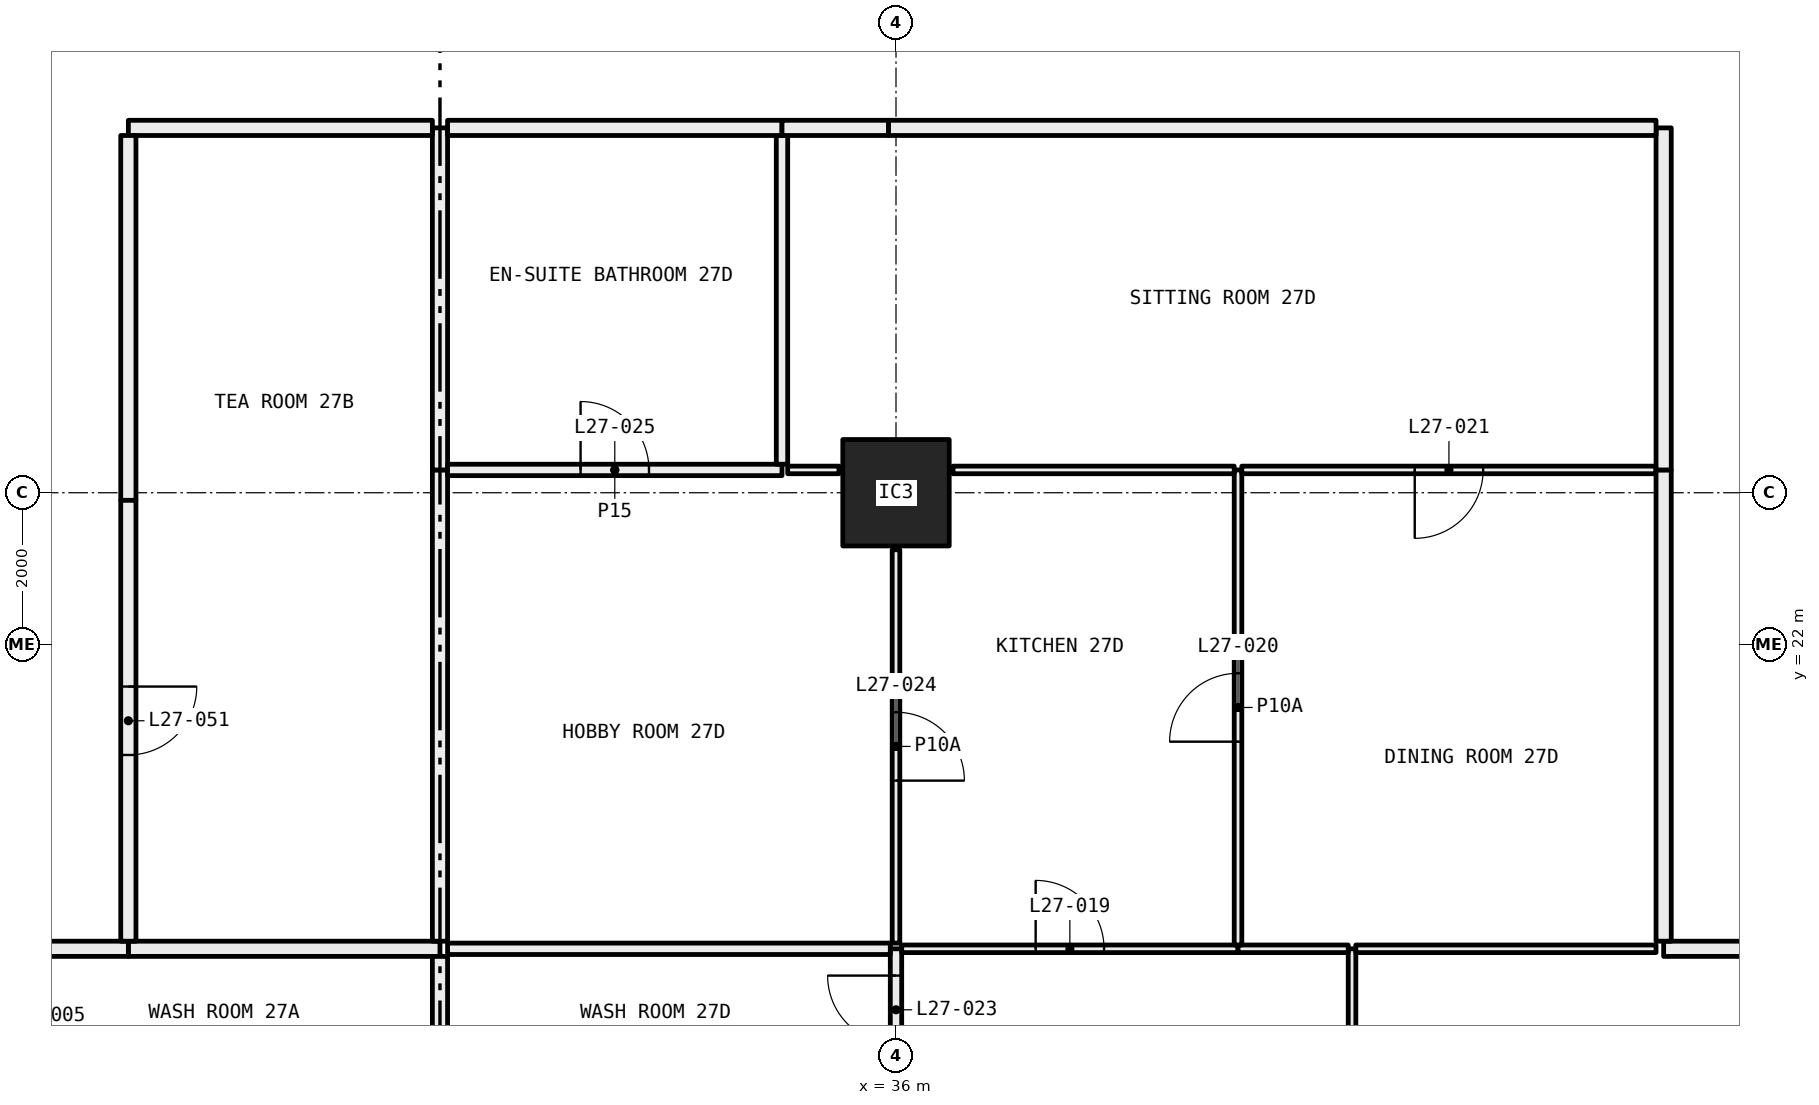
"""IFC4 building model, lengths in metres.
Left out: names, types, materials, properties, quantities, classifications, styles, units other than length and angle.
Written with IfcOpenShell. Run it as: python <this file> out.ifc"""

import sys

from ifc_helpers import new_model, si_unit, direction, frame, frame_2d, origin, origin_2d, place, context, subcontext, project, spatial, rectangle, hollow_rectangle, extrude, element, fill, save


model = new_model("IFC4")
c1 = context("Model", 3, precision=1e-05, world=origin(), true_north=direction((0.0, 1.0)))
c2 = subcontext(c1, "Body", "Model", "MODEL_VIEW")
j1 = project(units=[si_unit("LENGTHUNIT", "METRE"), si_unit("PLANEANGLEUNIT", "RADIAN")], contexts=[c1])
p1 = place(None, origin())
s1 = spatial("IfcSite", under=j1, at=p1, CompositionType="ELEMENT")
p2 = place(p1, origin())
s2 = spatial("IfcBuilding", under=s1, at=p2, CompositionType="ELEMENT")
p3 = place(p2, frame((0.0, 0.0, 106.95)))
s3 = spatial("IfcBuildingStorey", under=s2, at=p3, CompositionType="ELEMENT", Elevation=106.95)
p4 = place(p3, frame((36.0, 24.0, 0.0), z_axis=(0.0, 0.0, 1.0), x_axis=(1.0, 0.0, 0.0)))
e1 = element("IfcColumn", 1, at=p4, inside=s3, PredefinedType="COLUMN", context=c2, shape_type="SweptSolid", body=[
    extrude(hollow_rectangle(XDim=1.4, YDim=1.4, WallThickness=0.06, at=origin_2d()), origin(), (0.0, 0.0, 1.0), 3.05),
])
p5 = place(p3, frame((30.0, 18.0, 0.0), z_axis=(0.0, 0.0, 1.0), x_axis=(-1.0, 0.0, 0.0)))
e2 = element("IfcWall", 2, at=p5, inside=s3, PredefinedType="PARTITIONING", context=c2, shape_type="SweptSolid", body=[
    extrude(rectangle(XDim=4.1, YDim=0.2, at=frame_2d((2.05, 0.0))), origin(), (0.0, 0.0, 1.0), 3.05),
])
p6 = place(p3, frame((30.0, 16.32, 0.0), z_axis=(0.0, 0.0, 1.0), x_axis=(0.0, 1.0, 0.0)))
e3 = element("IfcWall", 3, at=p6, inside=s3, PredefinedType="PARTITIONING", context=c2, shape_type="SweptSolid", body=[
    extrude(rectangle(XDim=1.58, YDim=0.2, at=frame_2d((0.79, 0.0))), origin(), (0.0, 0.0, 1.0), 3.05),
])
p7 = place(p3, frame((25.9, 18.0, 0.0), z_axis=(0.0, 0.0, 1.0), x_axis=(-1.0, 0.0, 0.0)))
e4 = element("IfcWall", 4, at=p7, inside=s3, PredefinedType="PARTITIONING", context=c2, shape_type="SweptSolid", body=[
    extrude(rectangle(XDim=1.9, YDim=0.2, at=frame_2d((0.95, 0.0))), origin(), (0.0, 0.0, 1.0), 3.05),
])
p8 = place(p3, frame((30.0, 18.1, 0.0), z_axis=(0.0, 0.0, 1.0), x_axis=(0.0, 1.0, 0.0)))
e5 = element("IfcWall", 5, at=p8, inside=s3, PredefinedType="PARTITIONING", context=c2, shape_type="SweptSolid", body=[
    extrude(rectangle(XDim=6.2, YDim=0.2, at=frame_2d((3.1, 0.0))), origin(), (0.0, 0.0, 1.0), 2.45),
])
p9 = place(p3, frame((30.0, 24.3, 0.0), z_axis=(0.0, 0.0, 1.0), x_axis=(0.0, 1.0, 0.0)))
e6 = element("IfcWall", 6, at=p9, inside=s3, PredefinedType="PARTITIONING", context=c2, shape_type="SweptSolid", body=[
    extrude(rectangle(XDim=4.5, YDim=0.2, at=frame_2d((2.25, 0.0))), origin(), (0.0, 0.0, 1.0), 3.05),
])
p10 = place(p3, frame((29.9, 28.8, 0.0), z_axis=(0.0, 0.0, 1.0), x_axis=(-1.0, 0.0, 0.0)))
e7 = element("IfcWall", 7, at=p10, inside=s3, PredefinedType="PARTITIONING", context=c2, shape_type="SweptSolid", body=[
    extrude(rectangle(XDim=4.0, YDim=0.2, at=frame_2d((2.0, 0.0))), origin(), (0.0, 0.0, 1.0), 3.05),
])
p11 = place(p3, frame((25.9, 28.7, 0.0), z_axis=(0.0, 0.0, 1.0), x_axis=(0.0, -1.0, 0.0)))
e8 = element("IfcWall", 8, at=p11, inside=s3, PredefinedType="PARTITIONING", context=c2, shape_type="SweptSolid", body=[
    extrude(rectangle(XDim=4.8, YDim=0.2, at=frame_2d((2.4, 0.0))), origin(), (0.0, 0.0, 1.0), 2.45),
])
p12 = place(p3, frame((25.9, 23.9, 0.0), z_axis=(0.0, 0.0, 1.0), x_axis=(0.0, -1.0, 0.0)))
e9 = element("IfcWall", 9, at=p12, inside=s3, PredefinedType="PARTITIONING", context=c2, shape_type="SweptSolid", body=[
    extrude(rectangle(XDim=5.8, YDim=0.2, at=frame_2d((2.9, 0.0))), origin(), (0.0, 0.0, 1.0), 3.05),
])
p13 = place(p12, frame((2.45, 0.0, 0.0)))
e10 = element("IfcOpeningElement", 10, at=p13, cuts=e9, PredefinedType="OPENING", context=c2, shape_type="SweptSolid", body=[
    extrude(rectangle(XDim=0.9, YDim=2.1, at=frame_2d((0.45, 1.05))), frame((0.0, 0.11, 0.0), z_axis=(0.0, -1.0, 0.0), x_axis=(1.0, 0.0, 0.0)), (0.0, 0.0, 1.0), 0.22),
])
p14 = place(p3, frame((36.0, 16.395, 0.0), z_axis=(0.0, 0.0, 1.0), x_axis=(0.0, 1.0, 0.0)))
e11 = element("IfcWall", 11, at=p14, inside=s3, PredefinedType="PARTITIONING", context=c2, shape_type="SweptSolid", body=[
    extrude(rectangle(XDim=1.605, YDim=0.15, at=frame_2d((0.802, 0.0))), origin(), (0.0, 0.0, 1.0), 2.45),
])
p15 = place(p14, frame((0.353, 0.0, 0.0)))
e12 = element("IfcOpeningElement", 12, at=p15, cuts=e11, PredefinedType="OPENING", context=c2, shape_type="SweptSolid", body=[
    extrude(rectangle(XDim=0.9, YDim=2.1, at=frame_2d((0.45, 1.05))), frame((0.0, 0.085, 0.0), z_axis=(0.0, -1.0, 0.0), x_axis=(1.0, 0.0, 0.0)), (0.0, 0.0, 1.0), 0.17),
])
p16 = place(p3, frame((35.925, 18.0, 0.0), z_axis=(0.0, 0.0, 1.0), x_axis=(-1.0, 0.0, 0.0)))
e13 = element("IfcWall", 13, at=p16, inside=s3, PredefinedType="PARTITIONING", context=c2, shape_type="SweptSolid", body=[
    extrude(rectangle(XDim=5.825, YDim=0.15, at=frame_2d((2.913, 0.0))), origin(), (0.0, 0.0, 1.0), 2.45),
])
p17 = place(p3, frame((42.0, 12.72, 0.0), z_axis=(0.0, 0.0, 1.0), x_axis=(0.0, 1.0, 0.0)))
e14 = element("IfcWall", 14, at=p17, inside=s3, PredefinedType="PARTITIONING", context=c2, shape_type="SweptSolid", body=[
    extrude(rectangle(XDim=5.28, YDim=0.1, at=frame_2d((2.64, 0.0))), origin(), (0.0, 0.0, 1.0), 3.05),
])
p18 = place(p17, frame((2.19, 0.0, 0.0)))
e15 = element("IfcOpeningElement", 15, at=p18, cuts=e14, PredefinedType="OPENING", context=c2, shape_type="SweptSolid", body=[
    extrude(rectangle(XDim=0.9, YDim=2.1, at=frame_2d((0.45, 1.05))), frame((0.0, 0.06, 0.0), z_axis=(0.0, -1.0, 0.0), x_axis=(1.0, 0.0, 0.0)), (0.0, 0.0, 1.0), 0.12),
])
p19 = place(p3, frame((40.5, 18.0, 0.0), z_axis=(0.0, 0.0, 1.0), x_axis=(-1.0, 0.0, 0.0)))
e16 = element("IfcWall", 16, at=p19, inside=s3, PredefinedType="PARTITIONING", context=c2, shape_type="SweptSolid", body=[
    extrude(rectangle(XDim=4.425, YDim=0.1, at=frame_2d((2.212, 0.0))), origin(), (0.0, 0.0, 1.0), 2.45),
])
p20 = place(p19, frame((1.762, 0.0, 0.0)))
e17 = element("IfcOpeningElement", 17, at=p20, cuts=e16, PredefinedType="OPENING", context=c2, shape_type="SweptSolid", body=[
    extrude(rectangle(XDim=0.9, YDim=2.1, at=frame_2d((0.45, 1.05))), frame((0.0, 0.06, 0.0), z_axis=(0.0, -1.0, 0.0), x_axis=(1.0, 0.0, 0.0)), (0.0, 0.0, 1.0), 0.12),
])
p21 = place(p3, frame((41.95, 18.0, 0.0), z_axis=(0.0, 0.0, 1.0), x_axis=(-1.0, 0.0, 0.0)))
e18 = element("IfcWall", 18, at=p21, inside=s3, PredefinedType="PARTITIONING", context=c2, shape_type="SweptSolid", body=[
    extrude(rectangle(XDim=1.45, YDim=0.1, at=frame_2d((0.725, 0.0))), origin(), (0.0, 0.0, 1.0), 3.05),
])
p22 = place(p3, frame((46.0, 18.0, 0.0), z_axis=(0.0, 0.0, 1.0), x_axis=(-1.0, 0.0, 0.0)))
e19 = element("IfcWall", 19, at=p22, inside=s3, PredefinedType="PARTITIONING", context=c2, shape_type="SweptSolid", body=[
    extrude(rectangle(XDim=3.95, YDim=0.1, at=frame_2d((1.975, 0.0))), origin(), (0.0, 0.0, 1.0), 3.05),
])
p23 = place(p3, frame((48.0, 18.0, 0.0), z_axis=(0.0, 0.0, 1.0), x_axis=(-1.0, 0.0, 0.0)))
e20 = element("IfcWall", 20, at=p23, inside=s3, PredefinedType="PARTITIONING", context=c2, shape_type="SweptSolid", body=[
    extrude(rectangle(XDim=1.9, YDim=0.2, at=frame_2d((0.95, 0.0))), origin(), (0.0, 0.0, 1.0), 3.05),
])
p24 = place(p3, frame((36.0, 18.075, 0.0), z_axis=(0.0, 0.0, 1.0), x_axis=(0.0, 1.0, 0.0)))
e21 = element("IfcWall", 21, at=p24, inside=s3, PredefinedType="PARTITIONING", context=c2, shape_type="SweptSolid", body=[
    extrude(rectangle(XDim=5.175, YDim=0.1, at=frame_2d((2.587, 0.0))), origin(), (0.0, 0.0, 1.0), 2.45),
])
p25 = place(p24, frame((2.137, 0.0, 0.0)))
e22 = element("IfcOpeningElement", 22, at=p25, cuts=e21, PredefinedType="OPENING", context=c2, shape_type="SweptSolid", body=[
    extrude(rectangle(XDim=0.9, YDim=2.1, at=frame_2d((0.45, 1.05))), frame((0.0, 0.06, 0.0), z_axis=(0.0, -1.0, 0.0), x_axis=(1.0, 0.0, 0.0)), (0.0, 0.0, 1.0), 0.12),
])
p26 = place(p3, frame((34.5, 24.3, 0.0), z_axis=(0.0, 0.0, 1.0), x_axis=(-1.0, 0.0, 0.0)))
e23 = element("IfcWall", 23, at=p26, inside=s3, PredefinedType="PARTITIONING", context=c2, shape_type="SweptSolid", body=[
    extrude(rectangle(XDim=4.4, YDim=0.15, at=frame_2d((2.2, 0.0))), origin(), (0.0, 0.0, 1.0), 3.05),
])
p27 = place(p26, frame((1.75, 0.0, 0.0)))
e24 = element("IfcOpeningElement", 24, at=p27, cuts=e23, PredefinedType="OPENING", context=c2, shape_type="SweptSolid", body=[
    extrude(rectangle(XDim=0.9, YDim=2.1, at=frame_2d((0.45, 1.05))), frame((0.0, 0.085, 0.0), z_axis=(0.0, -1.0, 0.0), x_axis=(1.0, 0.0, 0.0)), (0.0, 0.0, 1.0), 0.17),
])
p28 = place(p3, frame((35.25, 24.3, 0.0), z_axis=(0.0, 0.0, 1.0), x_axis=(-1.0, 0.0, 0.0)))
e25 = element("IfcWall", 25, at=p28, inside=s3, PredefinedType="PARTITIONING", context=c2, shape_type="SweptSolid", body=[
    extrude(rectangle(XDim=0.675, YDim=0.1, at=frame_2d((0.337, 0.0))), origin(), (0.0, 0.0, 1.0), 3.05),
])
p29 = place(p3, frame((40.5, 18.05, 0.0), z_axis=(0.0, 0.0, 1.0), x_axis=(0.0, 1.0, 0.0)))
e26 = element("IfcWall", 26, at=p29, inside=s3, PredefinedType="PARTITIONING", context=c2, shape_type="SweptSolid", body=[
    extrude(rectangle(XDim=6.25, YDim=0.1, at=frame_2d((3.125, 0.0))), origin(), (0.0, 0.0, 1.0), 2.45),
])
p30 = place(p29, frame((2.675, 0.0, 0.0)))
e27 = element("IfcOpeningElement", 27, at=p30, cuts=e26, PredefinedType="OPENING", context=c2, shape_type="SweptSolid", body=[
    extrude(rectangle(XDim=0.9, YDim=2.1, at=frame_2d((0.45, 1.05))), frame((0.0, 0.06, 0.0), z_axis=(0.0, -1.0, 0.0), x_axis=(1.0, 0.0, 0.0)), (0.0, 0.0, 1.0), 0.12),
])
p31 = place(p3, frame((40.45, 24.3, 0.0), z_axis=(0.0, 0.0, 1.0), x_axis=(-1.0, 0.0, 0.0)))
e28 = element("IfcWall", 28, at=p31, inside=s3, PredefinedType="PARTITIONING", context=c2, shape_type="SweptSolid", body=[
    extrude(rectangle(XDim=3.7, YDim=0.1, at=frame_2d((1.85, 0.0))), origin(), (0.0, 0.0, 1.0), 3.05),
])
p32 = place(p3, frame((46.0, 24.3, 0.0), z_axis=(0.0, 0.0, 1.0), x_axis=(-1.0, 0.0, 0.0)))
e29 = element("IfcWall", 29, at=p32, inside=s3, PredefinedType="PARTITIONING", context=c2, shape_type="SweptSolid", body=[
    extrude(rectangle(XDim=5.45, YDim=0.1, at=frame_2d((2.725, 0.0))), origin(), (0.0, 0.0, 1.0), 3.05),
])
p33 = place(p32, frame((2.275, 0.0, 0.0)))
e30 = element("IfcOpeningElement", 30, at=p33, cuts=e29, PredefinedType="OPENING", context=c2, shape_type="SweptSolid", body=[
    extrude(rectangle(XDim=0.9, YDim=2.1, at=frame_2d((0.45, 1.05))), frame((0.0, 0.06, 0.0), z_axis=(0.0, -1.0, 0.0), x_axis=(1.0, 0.0, 0.0)), (0.0, 0.0, 1.0), 0.12),
])
p34 = place(p3, frame((46.1, 18.1, 0.0), z_axis=(0.0, 0.0, 1.0), x_axis=(0.0, 1.0, 0.0)))
e31 = element("IfcWall", 31, at=p34, inside=s3, PredefinedType="PARTITIONING", context=c2, shape_type="SweptSolid", body=[
    extrude(rectangle(XDim=6.2, YDim=0.2, at=frame_2d((3.1, 0.0))), origin(), (0.0, 0.0, 1.0), 2.45),
])
p35 = place(p3, frame((34.5, 24.375, 0.0), z_axis=(0.0, 0.0, 1.0), x_axis=(0.0, 1.0, 0.0)))
e32 = element("IfcWall", 32, at=p35, inside=s3, PredefinedType="PARTITIONING", context=c2, shape_type="SweptSolid", body=[
    extrude(rectangle(XDim=4.325, YDim=0.15, at=frame_2d((2.163, 0.0))), origin(), (0.0, 0.0, 1.0), 3.05),
])
p36 = place(p3, frame((34.5, 28.8, 0.0), z_axis=(0.0, 0.0, 1.0), x_axis=(-1.0, 0.0, 0.0)))
e33 = element("IfcWall", 33, at=p36, inside=s3, PredefinedType="PARTITIONING", context=c2, shape_type="SweptSolid", body=[
    extrude(rectangle(XDim=4.4, YDim=0.2, at=frame_2d((2.2, 0.0))), origin(), (0.0, 0.0, 1.0), 3.05),
])
p37 = place(p3, frame((46.1, 24.3, 0.0), z_axis=(0.0, 0.0, 1.0), x_axis=(0.0, 1.0, 0.0)))
e34 = element("IfcWall", 34, at=p37, inside=s3, PredefinedType="PARTITIONING", context=c2, shape_type="SweptSolid", body=[
    extrude(rectangle(XDim=4.5, YDim=0.2, at=frame_2d((2.25, 0.0))), origin(), (0.0, 0.0, 1.0), 3.05),
])
p38 = place(p3, frame((46.0, 28.8, 0.0), z_axis=(0.0, 0.0, 1.0), x_axis=(-1.0, 0.0, 0.0)))
e35 = element("IfcWall", 35, at=p38, inside=s3, PredefinedType="PARTITIONING", context=c2, shape_type="SweptSolid", body=[
    extrude(rectangle(XDim=10.1, YDim=0.2, at=frame_2d((5.05, 0.0))), origin(), (0.0, 0.0, 1.0), 2.45),
])
p39 = place(p3, frame((35.9, 28.8, 0.0), z_axis=(0.0, 0.0, 1.0), x_axis=(-1.0, 0.0, 0.0)))
e36 = element("IfcWall", 36, at=p39, inside=s3, PredefinedType="PARTITIONING", context=c2, shape_type="SweptSolid", body=[
    extrude(rectangle(XDim=1.4, YDim=0.2, at=frame_2d((0.7, 0.0))), origin(), (0.0, 0.0, 1.0), 3.05),
])
p40 = place(p20, frame((0.9, 0.0, 0.0), x_axis=(-1.0, 0.0, 0.0)))
e37 = element("IfcDoor", 37, at=p40, inside=s3, OperationType="SINGLE_SWING_RIGHT", PredefinedType="DOOR", context=c2, shape_type="SweptSolid", body=[
    extrude(rectangle(XDim=0.9, YDim=2.1, at=frame_2d((0.45, 1.05))), frame((0.0, 0.025, 0.0), z_axis=(0.0, -1.0, 0.0), x_axis=(1.0, 0.0, 0.0)), (0.0, 0.0, 1.0), 0.05),
])
fill(e17, e37)
p41 = place(p30, origin())
e38 = element("IfcDoor", 38, at=p41, inside=s3, OperationType="SINGLE_SWING_RIGHT", PredefinedType="DOOR", context=c2, shape_type="SweptSolid", body=[
    extrude(rectangle(XDim=0.9, YDim=2.1, at=frame_2d((0.45, 1.05))), frame((0.0, 0.025, 0.0), z_axis=(0.0, -1.0, 0.0), x_axis=(1.0, 0.0, 0.0)), (0.0, 0.0, 1.0), 0.05),
])
fill(e27, e38)
p42 = place(p33, origin())
e39 = element("IfcDoor", 39, at=p42, inside=s3, OperationType="SINGLE_SWING_LEFT", PredefinedType="DOOR", context=c2, shape_type="SweptSolid", body=[
    extrude(rectangle(XDim=0.9, YDim=2.1, at=frame_2d((0.45, 1.05))), frame((0.0, 0.025, 0.0), z_axis=(0.0, -1.0, 0.0), x_axis=(1.0, 0.0, 0.0)), (0.0, 0.0, 1.0), 0.05),
])
fill(e30, e39)
p43 = place(p15, origin())
e40 = element("IfcDoor", 40, at=p43, inside=s3, OperationType="SINGLE_SWING_LEFT", PredefinedType="DOOR", context=c2, shape_type="SweptSolid", body=[
    extrude(rectangle(XDim=0.9, YDim=2.1, at=frame_2d((0.45, 1.05))), frame((0.0, 0.025, 0.0), z_axis=(0.0, -1.0, 0.0), x_axis=(1.0, 0.0, 0.0)), (0.0, 0.0, 1.0), 0.05),
])
fill(e12, e40)
p44 = place(p25, frame((0.9, 0.0, 0.0), x_axis=(-1.0, 0.0, 0.0)))
e41 = element("IfcDoor", 41, at=p44, inside=s3, OperationType="SINGLE_SWING_LEFT", PredefinedType="DOOR", context=c2, shape_type="SweptSolid", body=[
    extrude(rectangle(XDim=0.9, YDim=2.1, at=frame_2d((0.45, 1.05))), frame((0.0, 0.025, 0.0), z_axis=(0.0, -1.0, 0.0), x_axis=(1.0, 0.0, 0.0)), (0.0, 0.0, 1.0), 0.05),
])
fill(e22, e41)
p45 = place(p27, frame((0.9, 0.0, 0.0), x_axis=(-1.0, 0.0, 0.0)))
e42 = element("IfcDoor", 42, at=p45, inside=s3, OperationType="SINGLE_SWING_RIGHT", PredefinedType="DOOR", context=c2, shape_type="SweptSolid", body=[
    extrude(rectangle(XDim=0.9, YDim=2.1, at=frame_2d((0.45, 1.05))), frame((0.0, 0.025, 0.0), z_axis=(0.0, -1.0, 0.0), x_axis=(1.0, 0.0, 0.0)), (0.0, 0.0, 1.0), 0.05),
])
fill(e24, e42)
p46 = place(p13, origin())
e43 = element("IfcDoor", 43, at=p46, inside=s3, OperationType="SINGLE_SWING_RIGHT", PredefinedType="DOOR", context=c2, shape_type="SweptSolid", body=[
    extrude(rectangle(XDim=0.9, YDim=2.1, at=frame_2d((0.45, 1.05))), frame((0.0, 0.025, 0.0), z_axis=(0.0, -1.0, 0.0), x_axis=(1.0, 0.0, 0.0)), (0.0, 0.0, 1.0), 0.05),
])
fill(e10, e43)
save(model, sys.argv[1])
